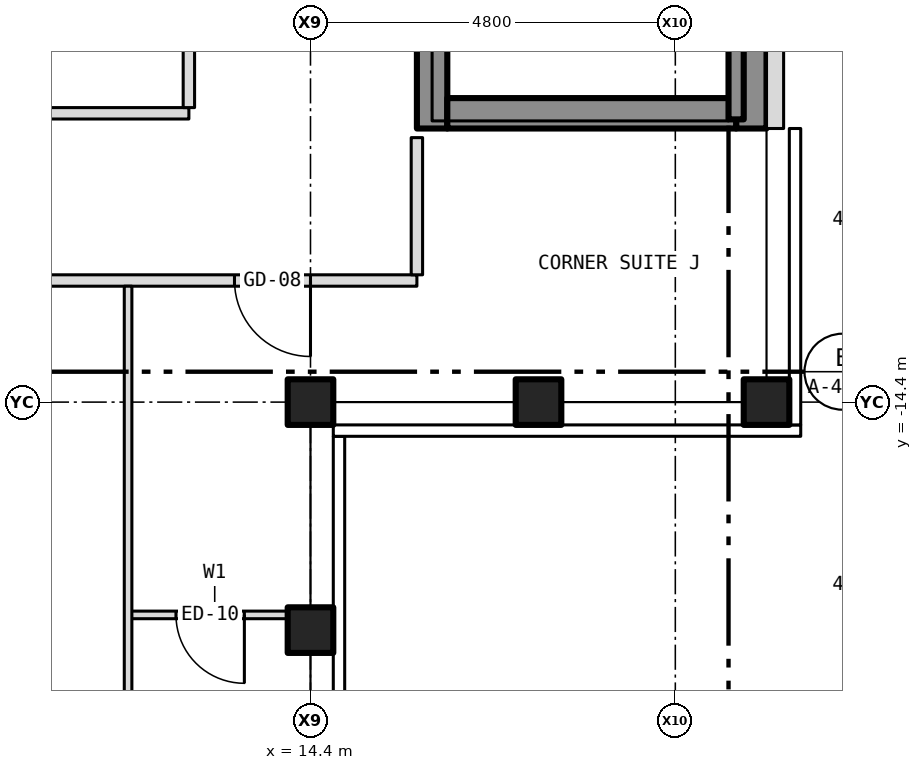
"""IFC4 building model, lengths in metres.
Left out: names, types, materials, properties, quantities, classifications, styles, units other than length and angle.
Written with IfcOpenShell. Run it as: python <this file> out.ifc"""

import sys

from ifc_helpers import new_model, si_unit, direction, frame, frame_2d, origin, origin_2d, place, context, subcontext, project, spatial, rectangle, hollow_rectangle, extrude, element, fill, save


model = new_model("IFC4")
c1 = context("Model", 3, precision=1e-05, world=origin(), true_north=direction((0.0, 1.0)))
c2 = subcontext(c1, "Body", "Model", "MODEL_VIEW")
j1 = project(units=[si_unit("LENGTHUNIT", "METRE"), si_unit("PLANEANGLEUNIT", "RADIAN")], contexts=[c1])
p1 = place(None, origin())
s1 = spatial("IfcSite", under=j1, at=p1, CompositionType="ELEMENT")
p2 = place(p1, origin())
s2 = spatial("IfcBuilding", under=s1, at=p2, CompositionType="ELEMENT")
p3 = place(p2, frame((0.0, 0.0, 258.5)))
s3 = spatial("IfcBuildingStorey", under=s2, at=p3, CompositionType="ELEMENT", Elevation=258.5)
for number, where, z_axis, x_axis in (
    (1, (20.4, -14.4, -0.15), (0.0, 0.0, 1.0), (1.0, 0.0, 0.0)),
    (2, (14.4, -14.4, -0.15), (0.0, 0.0, 1.0), (1.0, 0.0, 0.0)),
    (3, (14.4, -17.4, -0.15), (0.0, 0.0, 1.0), (1.0, 0.0, 0.0)),
    (4, (17.4, -14.4, -0.15), (0.0, 0.0, 1.0), (1.0, 0.0, 0.0)),
):
    element("IfcColumn", number, at=place(p3, frame(where, z_axis=z_axis, x_axis=x_axis)), inside=s3, PredefinedType="COLUMN", context=c2, shape_type="SweptSolid", body=[
        extrude(hollow_rectangle(XDim=0.6, YDim=0.6, WallThickness=0.03, at=origin_2d()), origin(), (0.0, 0.0, 1.0), 3.5),
    ])
p4 = place(p3, frame((16.0, -10.8, 0.0), z_axis=(0.0, 0.0, 1.0), x_axis=(0.0, 1.0, 0.0)))
e5 = element("IfcWall", 5, at=p4, inside=s3, PredefinedType="SHEAR", context=c2, shape_type="SweptSolid", body=[
    extrude(rectangle(XDim=21.6, YDim=0.4, at=frame_2d((10.8, 0.0))), origin(), (0.0, 0.0, 1.0), 3.25),
])
p5 = place(p4, frame((9.4, 0.0, 0.0)))
e6 = element("IfcOpeningElement", 6, at=p5, cuts=e5, PredefinedType="OPENING", context=c2, shape_type="SweptSolid", body=[
    extrude(rectangle(XDim=1.1, YDim=2.1, at=frame_2d((0.55, 1.05))), frame((0.0, 0.212, 0.0), z_axis=(0.0, -1.0, 0.0), x_axis=(1.0, 0.0, 0.0)), (0.0, 0.0, 1.0), 0.424),
])
p6 = place(p4, frame((11.5, 0.0, 0.0)))
e7 = element("IfcOpeningElement", 7, at=p6, cuts=e5, PredefinedType="OPENING", context=c2, shape_type="SweptSolid", body=[
    extrude(rectangle(XDim=1.1, YDim=2.1, at=frame_2d((0.55, 1.05))), frame((0.0, 0.212, 0.0), z_axis=(0.0, -1.0, 0.0), x_axis=(1.0, 0.0, 0.0)), (0.0, 0.0, 1.0), 0.424),
])
p7 = place(p4, frame((13.6, 0.0, 0.0)))
e8 = element("IfcOpeningElement", 8, at=p7, cuts=e5, PredefinedType="OPENING", context=c2, shape_type="SweptSolid", body=[
    extrude(rectangle(XDim=1.1, YDim=2.1, at=frame_2d((0.55, 1.05))), frame((0.0, 0.212, 0.0), z_axis=(0.0, -1.0, 0.0), x_axis=(1.0, 0.0, 0.0)), (0.0, 0.0, 1.0), 0.424),
])
p8 = place(p4, frame((15.7, 0.0, 0.0)))
e9 = element("IfcOpeningElement", 9, at=p8, cuts=e5, PredefinedType="OPENING", context=c2, shape_type="SweptSolid", body=[
    extrude(rectangle(XDim=1.1, YDim=2.1, at=frame_2d((0.55, 1.05))), frame((0.0, 0.212, 0.0), z_axis=(0.0, -1.0, 0.0), x_axis=(1.0, 0.0, 0.0)), (0.0, 0.0, 1.0), 0.424),
])
p9 = place(p4, frame((17.8, 0.0, 0.0)))
e10 = element("IfcOpeningElement", 10, at=p9, cuts=e5, PredefinedType="OPENING", context=c2, shape_type="SweptSolid", body=[
    extrude(rectangle(XDim=1.1, YDim=2.1, at=frame_2d((0.55, 1.05))), frame((0.0, 0.212, 0.0), z_axis=(0.0, -1.0, 0.0), x_axis=(1.0, 0.0, 0.0)), (0.0, 0.0, 1.0), 0.424),
])
p10 = place(p4, frame((5.642, 0.0, 0.0)))
e11 = element("IfcOpeningElement", 11, at=p10, cuts=e5, PredefinedType="OPENING", context=c2, shape_type="SweptSolid", body=[
    extrude(rectangle(XDim=1.1, YDim=2.1, at=frame_2d((0.55, 1.05))), frame((0.0, 0.212, 0.0), z_axis=(0.0, -1.0, 0.0), x_axis=(1.0, 0.0, 0.0)), (0.0, 0.0, 1.0), 0.424),
])
p11 = place(p4, frame((7.5, 0.0, 0.0)))
e12 = element("IfcOpeningElement", 12, at=p11, cuts=e5, PredefinedType="OPENING", context=c2, shape_type="SweptSolid", body=[
    extrude(rectangle(XDim=1.1, YDim=2.1, at=frame_2d((0.55, 1.05))), frame((0.0, 0.212, 0.0), z_axis=(0.0, -1.0, 0.0), x_axis=(1.0, 0.0, 0.0)), (0.0, 0.0, 1.0), 0.424),
])
p12 = place(p4, frame((20.0, 0.0, 0.0)))
e13 = element("IfcOpeningElement", 13, at=p12, cuts=e5, PredefinedType="OPENING", context=c2, shape_type="SweptSolid", body=[
    extrude(rectangle(XDim=0.9, YDim=2.1, at=frame_2d((0.45, 1.05))), frame((0.0, 0.212, 0.0), z_axis=(0.0, -1.0, 0.0), x_axis=(1.0, 0.0, 0.0)), (0.0, 0.0, 1.0), 0.424),
])
p13 = place(p3, frame((20.2, -10.8, 0.0), z_axis=(0.0, 0.0, 1.0), x_axis=(0.0, 1.0, 0.0)))
e14 = element("IfcWall", 14, at=p13, inside=s3, PredefinedType="SHEAR", context=c2, shape_type="SweptSolid", body=[
    extrude(rectangle(XDim=21.6, YDim=0.4, at=frame_2d((10.8, 0.0))), origin(), (0.0, 0.0, 1.0), 3.25),
])
p14 = place(p3, frame((16.2, -10.6, 0.0), z_axis=(0.0, 0.0, 1.0), x_axis=(1.0, 0.0, 0.0)))
e15 = element("IfcWall", 15, at=p14, inside=s3, PredefinedType="SHEAR", context=c2, shape_type="SweptSolid", body=[
    extrude(rectangle(XDim=3.8, YDim=0.4, at=frame_2d((1.9, 0.0))), origin(), (0.0, 0.0, 1.0), 3.25),
])
p15 = place(p3, frame((20.512, -10.8, 0.0), z_axis=(0.0, 0.0, 1.0), x_axis=(0.0, 1.0, 0.0)))
e16 = element("IfcWall", 16, at=p15, inside=s3, PredefinedType="SOLIDWALL", context=c2, shape_type="SweptSolid", body=[
    extrude(rectangle(XDim=21.6, YDim=0.225, at=frame_2d((10.8, 0.0))), origin(), (0.0, 0.0, 1.0), 3.5),
])
p16 = place(p15, frame((2.95, 0.0, 1.0)))
e17 = element("IfcOpeningElement", 17, at=p16, cuts=e16, PredefinedType="OPENING", context=c2, shape_type="SweptSolid", body=[
    extrude(rectangle(XDim=0.6, YDim=1.5, at=frame_2d((0.3, 0.75))), frame((0.0, 0.125, 0.0), z_axis=(0.0, -1.0, 0.0), x_axis=(1.0, 0.0, 0.0)), (0.0, 0.0, 1.0), 0.249),
])
p17 = place(p3, frame((12.0, -17.2, 0.0), z_axis=(0.0, 0.0, 1.0), x_axis=(1.0, 0.0, 0.0)))
e18 = element("IfcWall", 18, at=p17, inside=s3, PredefinedType="PARTITIONING", context=c2, shape_type="SweptSolid", body=[
    extrude(rectangle(XDim=2.28, YDim=0.1, at=frame_2d((1.14, 0.0))), origin(), (0.0, 0.0, 1.0), 3.35),
])
p18 = place(p17, frame((0.63, 0.0, 0.0)))
e19 = element("IfcOpeningElement", 19, at=p18, cuts=e18, PredefinedType="OPENING", context=c2, shape_type="SweptSolid", body=[
    extrude(rectangle(XDim=0.9, YDim=2.1, at=frame_2d((0.45, 1.05))), frame((0.0, 0.062, 0.0), z_axis=(0.0, -1.0, 0.0), x_axis=(1.0, 0.0, 0.0)), (0.0, 0.0, 1.0), 0.124),
])
p19 = place(p3, frame((-15.8, -12.8, 0.0), z_axis=(0.0, 0.0, 1.0), x_axis=(1.0, 0.0, 0.0)))
e20 = element("IfcWall", 20, at=p19, inside=s3, PredefinedType="PARTITIONING", context=c2, shape_type="SweptSolid", body=[
    extrude(rectangle(XDim=31.6, YDim=0.15, at=frame_2d((15.8, 0.0))), origin(), (0.0, 0.0, 1.0), 3.35),
])
p20 = place(p19, frame((6.8, 0.0, 0.0)))
e21 = element("IfcOpeningElement", 21, at=p20, cuts=e20, PredefinedType="OPENING", context=c2, shape_type="SweptSolid", body=[
    extrude(rectangle(XDim=1.0, YDim=2.1, at=frame_2d((0.5, 1.05))), frame((0.0, 0.087, 0.0), z_axis=(0.0, -1.0, 0.0), x_axis=(1.0, 0.0, 0.0)), (0.0, 0.0, 1.0), 0.174),
])
p21 = place(p19, frame((15.35, 0.0, 0.0)))
e22 = element("IfcOpeningElement", 22, at=p21, cuts=e20, PredefinedType="OPENING", context=c2, shape_type="SweptSolid", body=[
    extrude(rectangle(XDim=0.9, YDim=2.1, at=frame_2d((0.45, 1.05))), frame((0.0, 0.087, 0.0), z_axis=(0.0, -1.0, 0.0), x_axis=(1.0, 0.0, 0.0)), (0.0, 0.0, 1.0), 0.174),
])
p22 = place(p19, frame((24.95, 0.0, 0.0)))
e23 = element("IfcOpeningElement", 23, at=p22, cuts=e20, PredefinedType="OPENING", context=c2, shape_type="SweptSolid", body=[
    extrude(rectangle(XDim=0.9, YDim=2.1, at=frame_2d((0.45, 1.05))), frame((0.0, 0.087, 0.0), z_axis=(0.0, -1.0, 0.0), x_axis=(1.0, 0.0, 0.0)), (0.0, 0.0, 1.0), 0.174),
])
p23 = place(p19, frame((1.4, 0.0, 0.0)))
e24 = element("IfcOpeningElement", 24, at=p23, cuts=e20, PredefinedType="OPENING", context=c2, shape_type="SweptSolid", body=[
    extrude(rectangle(XDim=1.0, YDim=2.1, at=frame_2d((0.5, 1.05))), frame((0.0, 0.087, 0.0), z_axis=(0.0, -1.0, 0.0), x_axis=(1.0, 0.0, 0.0)), (0.0, 0.0, 1.0), 0.174),
])
p24 = place(p19, frame((29.2, 0.0, 0.0)))
e25 = element("IfcOpeningElement", 25, at=p24, cuts=e20, PredefinedType="OPENING", context=c2, shape_type="SweptSolid", body=[
    extrude(rectangle(XDim=1.0, YDim=2.1, at=frame_2d((0.5, 1.05))), frame((0.0, 0.087, 0.0), z_axis=(0.0, -1.0, 0.0), x_axis=(1.0, 0.0, 0.0)), (0.0, 0.0, 1.0), 0.174),
])
p25 = place(p3, frame((8.1, -10.6, 0.0), z_axis=(0.0, 0.0, 1.0), x_axis=(1.0, 0.0, 0.0)))
e26 = element("IfcWall", 26, at=p25, inside=s3, PredefinedType="PARTITIONING", context=c2, shape_type="SweptSolid", body=[
    extrude(rectangle(XDim=4.7, YDim=0.15, at=frame_2d((2.35, 0.0))), origin(), (0.0, 0.0, 1.0), 3.35),
])
p26 = place(p3, frame((12.0, -20.73, 0.0), z_axis=(0.0, 0.0, 1.0), x_axis=(0.0, 1.0, 0.0)))
e27 = element("IfcWall", 27, at=p26, inside=s3, PredefinedType="PARTITIONING", context=c2, shape_type="SweptSolid", body=[
    extrude(rectangle(XDim=7.855, YDim=0.1, at=frame_2d((3.927, 0.0))), origin(), (0.0, 0.0, 1.0), 3.35),
])
p27 = place(p3, frame((12.8, -10.525, 0.0), z_axis=(0.0, 0.0, 1.0), x_axis=(0.0, 1.0, 0.0)))
e28 = element("IfcWall", 28, at=p27, inside=s3, PredefinedType="PARTITIONING", context=c2, shape_type="SweptSolid", body=[
    extrude(rectangle(XDim=8.525, YDim=0.15, at=frame_2d((4.262, 0.0))), origin(), (0.0, 0.0, 1.0), 3.35),
])
p28 = place(p3, frame((15.8, -12.725, 0.0), z_axis=(0.0, 0.0, 1.0), x_axis=(0.0, 1.0, 0.0)))
e29 = element("IfcWall", 29, at=p28, inside=s3, PredefinedType="PARTITIONING", context=c2, shape_type="SweptSolid", body=[
    extrude(rectangle(XDim=1.805, YDim=0.15, at=frame_2d((0.903, 0.0))), origin(), (0.0, 0.0, 1.0), 3.35),
])
p29 = place(p3, frame((20.0, -10.68, 0.0), z_axis=(0.0, 0.0, 1.0), x_axis=(0.0, 1.0, 0.0)))
e30 = element("IfcWall", 30, at=p29, inside=s3, PredefinedType="SHEAR", context=c2, shape_type="SweptSolid", body=[
    extrude(rectangle(XDim=6.98, YDim=0.2, at=frame_2d((3.49, 0.0))), origin(), (0.0, 0.0, 1.0), 3.25),
])
p30 = place(p18, origin())
e31 = element("IfcDoor", 31, at=p30, inside=s3, OperationType="SINGLE_SWING_RIGHT", PredefinedType="DOOR", context=c2, shape_type="SweptSolid", body=[
    extrude(rectangle(XDim=0.9, YDim=2.1, at=frame_2d((0.45, 1.05))), frame((0.0, 0.025, 0.0), z_axis=(0.0, -1.0, 0.0), x_axis=(1.0, 0.0, 0.0)), (0.0, 0.0, 1.0), 0.05),
])
fill(e19, e31)
p31 = place(p24, origin())
e32 = element("IfcDoor", 32, at=p31, inside=s3, OperationType="SINGLE_SWING_RIGHT", PredefinedType="DOOR", context=c2, shape_type="SweptSolid", body=[
    extrude(rectangle(XDim=1.0, YDim=2.1, at=frame_2d((0.5, 1.05))), frame((0.0, 0.025, 0.0), z_axis=(0.0, -1.0, 0.0), x_axis=(1.0, 0.0, 0.0)), (0.0, 0.0, 1.0), 0.05),
])
fill(e25, e32)
save(model, sys.argv[1])
